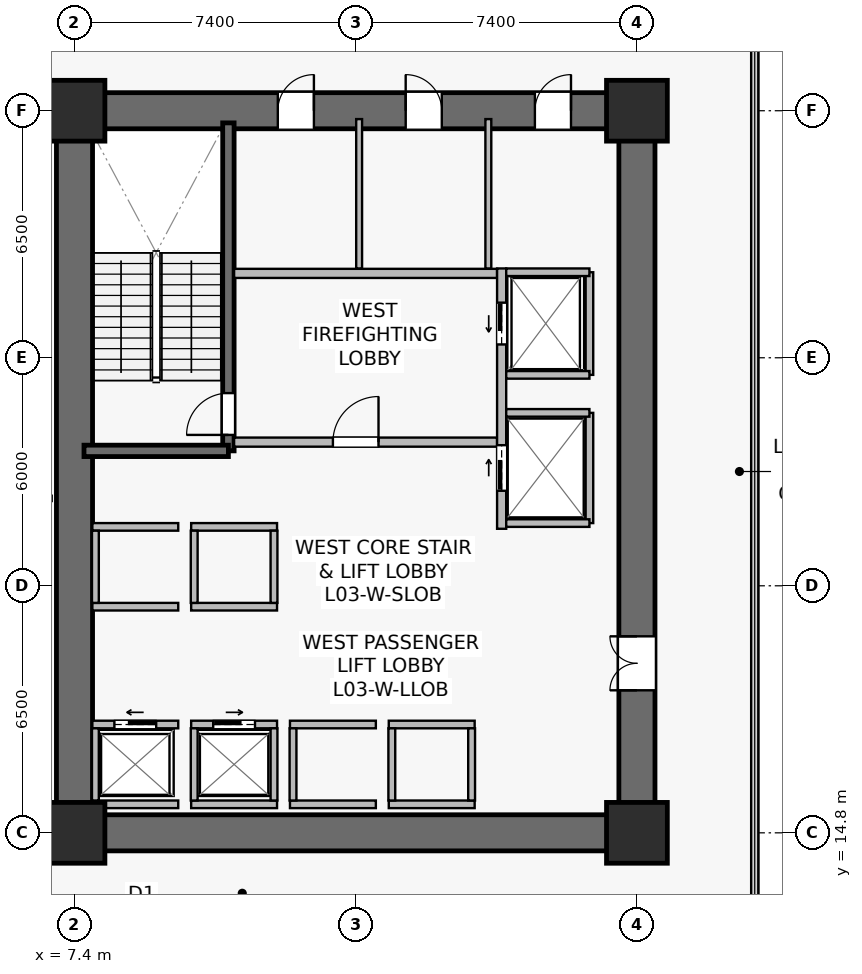
"""IFC4 building model, lengths in metres.
Left out: names, types, materials, properties, quantities, classifications, styles, units other than length and angle.
Written with IfcOpenShell. Run it as: python <this file> out.ifc"""

import sys

from ifc_helpers import new_model, si_unit, direction, frame, frame_2d, origin, origin_2d, place, context, subcontext, project, spatial, rectangle, extrude, source, transform, mapped, element, fill, save


model = new_model("IFC4")
c1 = context("Model", 3, precision=1e-05, world=origin(), true_north=direction((0.0, 1.0)))
c2 = subcontext(c1, "Body", "Model", "MODEL_VIEW")
j1 = project(units=[si_unit("LENGTHUNIT", "METRE"), si_unit("PLANEANGLEUNIT", "RADIAN")], contexts=[c1])
p1 = place(None, origin())
s1 = spatial("IfcSite", under=j1, at=p1, CompositionType="ELEMENT")
p2 = place(p1, origin())
s2 = spatial("IfcBuilding", under=s1, at=p2, CompositionType="ELEMENT")
p3 = place(p2, frame((0.0, 0.0, 10.2)))
s3 = spatial("IfcBuildingStorey", under=s2, at=p3, CompositionType="ELEMENT", Elevation=10.2)
p4 = place(p3, frame((6.925, 14.8, 0.0), z_axis=(0.0, 0.0, 1.0), x_axis=(1.0, 0.0, 0.0)))
e1 = element("IfcWall", 1, at=p4, inside=s3, PredefinedType="SHEAR", context=c2, shape_type="SweptSolid", body=[
    extrude(rectangle(XDim=15.75, YDim=0.95, at=frame_2d((7.875, 0.0))), origin(), (0.0, 0.0, 1.0), 4.45),
])
p5 = place(p3, frame((6.925, 33.8, 0.0), z_axis=(0.0, 0.0, 1.0), x_axis=(1.0, 0.0, 0.0)))
e2 = element("IfcWall", 2, at=p5, inside=s3, PredefinedType="SHEAR", context=c2, shape_type="SweptSolid", body=[
    extrude(rectangle(XDim=15.75, YDim=0.95, at=frame_2d((7.875, 0.0))), origin(), (0.0, 0.0, 1.0), 4.45),
])
p6 = place(p5, frame((5.825, 0.0, 0.0)))
e3 = element("IfcOpeningElement", 3, at=p6, cuts=e2, PredefinedType="OPENING", context=c2, shape_type="SweptSolid", body=[
    extrude(rectangle(XDim=0.95, YDim=2.15, at=frame_2d((0.475, 1.075))), frame((0.0, 0.485, 0.0), z_axis=(0.0, -1.0, 0.0), x_axis=(1.0, 0.0, 0.0)), (0.0, 0.0, 1.0), 0.97),
])
p7 = place(p5, frame((9.19, 0.0, 0.0)))
e4 = element("IfcOpeningElement", 4, at=p7, cuts=e2, PredefinedType="OPENING", context=c2, shape_type="SweptSolid", body=[
    extrude(rectangle(XDim=0.95, YDim=2.15, at=frame_2d((0.475, 1.075))), frame((0.0, 0.485, 0.0), z_axis=(0.0, -1.0, 0.0), x_axis=(1.0, 0.0, 0.0)), (0.0, 0.0, 1.0), 0.97),
])
p8 = place(p5, frame((12.59, 0.0, 0.0)))
e5 = element("IfcOpeningElement", 5, at=p8, cuts=e2, PredefinedType="OPENING", context=c2, shape_type="SweptSolid", body=[
    extrude(rectangle(XDim=0.95, YDim=2.15, at=frame_2d((0.475, 1.075))), frame((0.0, 0.485, 0.0), z_axis=(0.0, -1.0, 0.0), x_axis=(1.0, 0.0, 0.0)), (0.0, 0.0, 1.0), 0.97),
])
p9 = place(p3, frame((7.4, 15.275, 0.0), z_axis=(0.0, 0.0, 1.0), x_axis=(0.0, 1.0, 0.0)))
e6 = element("IfcWall", 6, at=p9, inside=s3, PredefinedType="SHEAR", context=c2, shape_type="SweptSolid", body=[
    extrude(rectangle(XDim=18.05, YDim=0.95, at=frame_2d((9.025, 0.0))), origin(), (0.0, 0.0, 1.0), 4.45),
])
p10 = place(p3, frame((22.2, 15.275, 0.0), z_axis=(0.0, 0.0, 1.0), x_axis=(0.0, 1.0, 0.0)))
e7 = element("IfcWall", 7, at=p10, inside=s3, PredefinedType="SHEAR", context=c2, shape_type="SweptSolid", body=[
    extrude(rectangle(XDim=18.05, YDim=0.95, at=frame_2d((9.025, 0.0))), origin(), (0.0, 0.0, 1.0), 4.45),
])
p11 = place(p10, frame((3.275, 0.0, 0.0)))
e8 = element("IfcOpeningElement", 8, at=p11, cuts=e7, PredefinedType="OPENING", context=c2, shape_type="SweptSolid", body=[
    extrude(rectangle(XDim=1.42, YDim=2.2, at=frame_2d((0.71, 1.1))), frame((0.0, 0.485, 0.0), z_axis=(0.0, -1.0, 0.0), x_axis=(1.0, 0.0, 0.0)), (0.0, 0.0, 1.0), 0.97),
])
p12 = place(p3, frame((11.45, 24.85, 0.0), z_axis=(0.0, 0.0, 1.0), x_axis=(0.0, 1.0, 0.0)))
e9 = element("IfcWall", 9, at=p12, inside=s3, PredefinedType="SHEAR", context=c2, shape_type="SweptSolid", body=[
    extrude(rectangle(XDim=8.63, YDim=0.3, at=frame_2d((4.315, 0.0))), origin(), (0.0, 0.0, 1.0), 4.45),
])
p13 = place(p12, frame((0.42, 0.0, 0.0)))
e10 = element("IfcOpeningElement", 10, at=p13, cuts=e9, PredefinedType="OPENING", context=c2, shape_type="SweptSolid", body=[
    extrude(rectangle(XDim=1.1, YDim=2.15, at=frame_2d((0.55, 1.075))), frame((0.0, 0.16, 0.0), z_axis=(0.0, -1.0, 0.0), x_axis=(1.0, 0.0, 0.0)), (0.0, 0.0, 1.0), 0.32),
])
p14 = place(p3, frame((7.65, 24.85, 0.0), z_axis=(0.0, 0.0, 1.0), x_axis=(1.0, 0.0, 0.0)))
e11 = element("IfcWall", 11, at=p14, inside=s3, PredefinedType="SHEAR", context=c2, shape_type="SweptSolid", body=[
    extrude(rectangle(XDim=3.8, YDim=0.3, at=frame_2d((1.9, 0.0))), origin(), (0.0, 0.0, 1.0), 4.45),
])
m1 = source(origin(), c2, "Body", "SweptSolid", [
    extrude(rectangle(XDim=1.6, YDim=1.6, at=origin_2d()), origin(), (0.0, 0.0, 1.0), 4.8),
])
for number, where, z_axis, x_axis in (
    (12, (7.4, 14.8, 0.0), (0.0, 0.0, 1.0), (1.0, 0.0, 0.0)),
    (13, (22.2, 14.8, 0.0), (0.0, 0.0, 1.0), (1.0, 0.0, 0.0)),
    (14, (7.4, 33.8, 0.0), (0.0, 0.0, 1.0), (1.0, 0.0, 0.0)),
    (15, (22.2, 33.8, 0.0), (0.0, 0.0, 1.0), (1.0, 0.0, 0.0)),
):
    element("IfcColumn", number, at=place(p3, frame(where, z_axis=z_axis, x_axis=x_axis)), inside=s3, PredefinedType="COLUMN", context=c2, shape_type="MappedRepresentation", body=[
        mapped(m1, transform((0.0, 0.0, 0.0), scale=1.0)),
    ])
p15 = place(p3, frame((11.6, 25.08, 0.0), z_axis=(0.0, 0.0, 1.0), x_axis=(1.0, 0.0, 0.0)))
e16 = element("IfcWall", 16, at=p15, inside=s3, PredefinedType="SOLIDWALL", context=c2, shape_type="SweptSolid", body=[
    extrude(rectangle(XDim=6.92, YDim=0.24, at=frame_2d((3.46, 0.0))), origin(), (0.0, 0.0, 1.0), 3.735),
])
p16 = place(p15, frame((2.6, 0.0, 0.0)))
e17 = element("IfcOpeningElement", 17, at=p16, cuts=e16, PredefinedType="OPENING", context=c2, shape_type="SweptSolid", body=[
    extrude(rectangle(XDim=1.2, YDim=2.16, at=frame_2d((0.6, 1.08))), frame((0.0, 0.13, 0.0), z_axis=(0.0, -1.0, 0.0), x_axis=(1.0, 0.0, 0.0)), (0.0, 0.0, 1.0), 0.26),
])
p17 = place(p3, frame((11.6, 29.52, 0.0), z_axis=(0.0, 0.0, 1.0), x_axis=(1.0, 0.0, 0.0)))
e18 = element("IfcWall", 18, at=p17, inside=s3, PredefinedType="SOLIDWALL", context=c2, shape_type="SweptSolid", body=[
    extrude(rectangle(XDim=6.92, YDim=0.24, at=frame_2d((3.46, 0.0))), origin(), (0.0, 0.0, 1.0), 3.735),
])
p18 = place(p3, frame((18.64, 22.8, 0.0), z_axis=(0.0, 0.0, 1.0), x_axis=(0.0, 1.0, 0.0)))
e19 = element("IfcWall", 19, at=p18, inside=s3, PredefinedType="SOLIDWALL", context=c2, shape_type="SweptSolid", body=[
    extrude(rectangle(XDim=6.85, YDim=0.24, at=frame_2d((3.425, 0.0))), origin(), (0.0, 0.0, 1.0), 3.535),
])
p19 = place(p18, frame((4.85, 0.0, 0.0)))
e20 = element("IfcOpeningElement", 20, at=p19, cuts=e19, PredefinedType="OPENING", context=c2, shape_type="SweptSolid", body=[
    extrude(rectangle(XDim=1.1, YDim=2.22, at=frame_2d((0.55, 1.11))), frame((0.0, 0.13, 0.0), z_axis=(0.0, -1.0, 0.0), x_axis=(1.0, 0.0, 0.0)), (0.0, 0.0, 1.0), 0.26),
])
p20 = place(p18, frame((1.0, 0.0, 0.0)))
e21 = element("IfcOpeningElement", 21, at=p20, cuts=e19, PredefinedType="OPENING", context=c2, shape_type="SweptSolid", body=[
    extrude(rectangle(XDim=1.2, YDim=2.22, at=frame_2d((0.6, 1.11))), frame((0.0, 0.13, 0.0), z_axis=(0.0, -1.0, 0.0), x_axis=(1.0, 0.0, 0.0)), (0.0, 0.0, 1.0), 0.26),
])
p21 = place(p3, frame((7.87, 17.65, 0.0), z_axis=(0.0, 0.0, 1.0), x_axis=(1.0, 0.0, 0.0)))
e22 = element("IfcWall", 22, at=p21, inside=s3, PredefinedType="SOLIDWALL", context=c2, shape_type="SweptSolid", body=[
    extrude(rectangle(XDim=2.26, YDim=0.2, at=frame_2d((1.13, 0.0))), origin(), (0.0, 0.0, 1.0), 4.45),
])
p22 = place(p21, frame((0.58, 0.0, 0.0)))
e23 = element("IfcOpeningElement", 23, at=p22, cuts=e22, PredefinedType="OPENING", context=c2, shape_type="SweptSolid", body=[
    extrude(rectangle(XDim=1.1, YDim=2.22, at=frame_2d((0.55, 1.11))), frame((0.0, 0.11, 0.0), z_axis=(0.0, -1.0, 0.0), x_axis=(1.0, 0.0, 0.0)), (0.0, 0.0, 1.0), 0.22),
])
p23 = place(p3, frame((7.87, 15.55, 0.0), z_axis=(0.0, 0.0, 1.0), x_axis=(1.0, 0.0, 0.0)))
e24 = element("IfcWall", 24, at=p23, inside=s3, PredefinedType="SOLIDWALL", context=c2, shape_type="SweptSolid", body=[
    extrude(rectangle(XDim=2.26, YDim=0.2, at=frame_2d((1.13, 0.0))), origin(), (0.0, 0.0, 1.0), 4.45),
])
p24 = place(p3, frame((7.95, 15.65, 0.0), z_axis=(0.0, 0.0, 1.0), x_axis=(0.0, 1.0, 0.0)))
e25 = element("IfcWall", 25, at=p24, inside=s3, PredefinedType="SOLIDWALL", context=c2, shape_type="SweptSolid", body=[
    extrude(rectangle(XDim=1.9, YDim=0.18, at=frame_2d((0.95, 0.0))), origin(), (0.0, 0.0, 1.0), 4.45),
])
p25 = place(p3, frame((10.47, 17.65, 0.0), z_axis=(0.0, 0.0, 1.0), x_axis=(1.0, 0.0, 0.0)))
e26 = element("IfcWall", 26, at=p25, inside=s3, PredefinedType="SOLIDWALL", context=c2, shape_type="SweptSolid", body=[
    extrude(rectangle(XDim=2.26, YDim=0.2, at=frame_2d((1.13, 0.0))), origin(), (0.0, 0.0, 1.0), 4.45),
])
p26 = place(p25, frame((0.58, 0.0, 0.0)))
e27 = element("IfcOpeningElement", 27, at=p26, cuts=e26, PredefinedType="OPENING", context=c2, shape_type="SweptSolid", body=[
    extrude(rectangle(XDim=1.1, YDim=2.22, at=frame_2d((0.55, 1.11))), frame((0.0, 0.11, 0.0), z_axis=(0.0, -1.0, 0.0), x_axis=(1.0, 0.0, 0.0)), (0.0, 0.0, 1.0), 0.22),
])
p27 = place(p3, frame((10.47, 15.55, 0.0), z_axis=(0.0, 0.0, 1.0), x_axis=(1.0, 0.0, 0.0)))
e28 = element("IfcWall", 28, at=p27, inside=s3, PredefinedType="SOLIDWALL", context=c2, shape_type="SweptSolid", body=[
    extrude(rectangle(XDim=2.26, YDim=0.2, at=frame_2d((1.13, 0.0))), origin(), (0.0, 0.0, 1.0), 4.45),
])
for number, where, z_axis, x_axis in (
    (29, (10.55, 15.65, 0.0), (0.0, 0.0, 1.0), (0.0, 1.0, 0.0)),
    (30, (12.65, 15.65, 0.0), (0.0, 0.0, 1.0), (0.0, 1.0, 0.0)),
):
    element("IfcWall", number, at=place(p3, frame(where, z_axis=z_axis, x_axis=x_axis)), inside=s3, PredefinedType="SOLIDWALL", context=c2, shape_type="SweptSolid", body=[
        extrude(rectangle(XDim=1.9, YDim=0.18, at=frame_2d((0.95, 0.0))), origin(), (0.0, 0.0, 1.0), 4.45),
    ])
for number, where, z_axis, x_axis in (
    (31, (13.07, 17.65, 0.0), (0.0, 0.0, 1.0), (1.0, 0.0, 0.0)),
    (32, (13.07, 15.55, 0.0), (0.0, 0.0, 1.0), (1.0, 0.0, 0.0)),
):
    element("IfcWall", number, at=place(p3, frame(where, z_axis=z_axis, x_axis=x_axis)), inside=s3, PredefinedType="SOLIDWALL", context=c2, shape_type="SweptSolid", body=[
        extrude(rectangle(XDim=2.26, YDim=0.2, at=frame_2d((1.13, 0.0))), origin(), (0.0, 0.0, 1.0), 3.735),
    ])
p28 = place(p3, frame((13.15, 15.65, 0.0), z_axis=(0.0, 0.0, 1.0), x_axis=(0.0, 1.0, 0.0)))
e33 = element("IfcWall", 33, at=p28, inside=s3, PredefinedType="SOLIDWALL", context=c2, shape_type="SweptSolid", body=[
    extrude(rectangle(XDim=1.9, YDim=0.18, at=frame_2d((0.95, 0.0))), origin(), (0.0, 0.0, 1.0), 4.45),
])
for number, where, z_axis, x_axis in (
    (34, (15.67, 17.65, 0.0), (0.0, 0.0, 1.0), (1.0, 0.0, 0.0)),
    (35, (15.67, 15.55, 0.0), (0.0, 0.0, 1.0), (1.0, 0.0, 0.0)),
):
    element("IfcWall", number, at=place(p3, frame(where, z_axis=z_axis, x_axis=x_axis)), inside=s3, PredefinedType="SOLIDWALL", context=c2, shape_type="SweptSolid", body=[
        extrude(rectangle(XDim=2.26, YDim=0.2, at=frame_2d((1.13, 0.0))), origin(), (0.0, 0.0, 1.0), 4.45),
    ])
for number, where, z_axis, x_axis in (
    (36, (15.75, 15.65, 0.0), (0.0, 0.0, 1.0), (0.0, 1.0, 0.0)),
    (37, (17.85, 15.65, 0.0), (0.0, 0.0, 1.0), (0.0, 1.0, 0.0)),
):
    element("IfcWall", number, at=place(p3, frame(where, z_axis=z_axis, x_axis=x_axis)), inside=s3, PredefinedType="SOLIDWALL", context=c2, shape_type="SweptSolid", body=[
        extrude(rectangle(XDim=1.9, YDim=0.18, at=frame_2d((0.95, 0.0))), origin(), (0.0, 0.0, 1.0), 4.45),
    ])
for number, where, z_axis, x_axis in (
    (38, (7.87, 20.75, 0.0), (0.0, 0.0, 1.0), (1.0, 0.0, 0.0)),
    (39, (7.87, 22.85, 0.0), (0.0, 0.0, 1.0), (1.0, 0.0, 0.0)),
):
    element("IfcWall", number, at=place(p3, frame(where, z_axis=z_axis, x_axis=x_axis)), inside=s3, PredefinedType="SOLIDWALL", context=c2, shape_type="SweptSolid", body=[
        extrude(rectangle(XDim=2.26, YDim=0.2, at=frame_2d((1.13, 0.0))), origin(), (0.0, 0.0, 1.0), 4.45),
    ])
p29 = place(p3, frame((7.95, 20.85, 0.0), z_axis=(0.0, 0.0, 1.0), x_axis=(0.0, 1.0, 0.0)))
e40 = element("IfcWall", 40, at=p29, inside=s3, PredefinedType="SOLIDWALL", context=c2, shape_type="SweptSolid", body=[
    extrude(rectangle(XDim=1.9, YDim=0.18, at=frame_2d((0.95, 0.0))), origin(), (0.0, 0.0, 1.0), 4.45),
])
for number, where, z_axis, x_axis in (
    (41, (10.47, 20.75, 0.0), (0.0, 0.0, 1.0), (1.0, 0.0, 0.0)),
    (42, (10.47, 22.85, 0.0), (0.0, 0.0, 1.0), (1.0, 0.0, 0.0)),
):
    element("IfcWall", number, at=place(p3, frame(where, z_axis=z_axis, x_axis=x_axis)), inside=s3, PredefinedType="SOLIDWALL", context=c2, shape_type="SweptSolid", body=[
        extrude(rectangle(XDim=2.26, YDim=0.2, at=frame_2d((1.13, 0.0))), origin(), (0.0, 0.0, 1.0), 4.45),
    ])
for number, where, z_axis, x_axis in (
    (43, (10.55, 20.85, 0.0), (0.0, 0.0, 1.0), (0.0, 1.0, 0.0)),
    (44, (12.65, 20.85, 0.0), (0.0, 0.0, 1.0), (0.0, 1.0, 0.0)),
):
    element("IfcWall", number, at=place(p3, frame(where, z_axis=z_axis, x_axis=x_axis)), inside=s3, PredefinedType="SOLIDWALL", context=c2, shape_type="SweptSolid", body=[
        extrude(rectangle(XDim=1.9, YDim=0.18, at=frame_2d((0.95, 0.0))), origin(), (0.0, 0.0, 1.0), 4.45),
    ])
p30 = place(p3, frame((20.95, 26.85, 0.0), z_axis=(0.0, 0.0, 1.0), x_axis=(0.0, 1.0, 0.0)))
e45 = element("IfcWall", 45, at=p30, inside=s3, PredefinedType="SOLIDWALL", context=c2, shape_type="SweptSolid", body=[
    extrude(rectangle(XDim=2.7, YDim=0.2, at=frame_2d((1.35, 0.0))), origin(), (0.0, 0.0, 1.0), 4.45),
])
p31 = place(p3, frame((18.76, 29.55, 0.0), z_axis=(0.0, 0.0, 1.0), x_axis=(1.0, 0.0, 0.0)))
e46 = element("IfcWall", 46, at=p31, inside=s3, PredefinedType="SOLIDWALL", context=c2, shape_type="SweptSolid", body=[
    extrude(rectangle(XDim=2.19, YDim=0.2, at=frame_2d((1.095, 0.0))), origin(), (0.0, 0.0, 1.0), 4.45),
])
p32 = place(p3, frame((18.76, 26.85, 0.0), z_axis=(0.0, 0.0, 1.0), x_axis=(1.0, 0.0, 0.0)))
e47 = element("IfcWall", 47, at=p32, inside=s3, PredefinedType="SOLIDWALL", context=c2, shape_type="SweptSolid", body=[
    extrude(rectangle(XDim=2.19, YDim=0.2, at=frame_2d((1.095, 0.0))), origin(), (0.0, 0.0, 1.0), 3.847),
])
p33 = place(p3, frame((20.95, 22.95, 0.0), z_axis=(0.0, 0.0, 1.0), x_axis=(0.0, 1.0, 0.0)))
e48 = element("IfcWall", 48, at=p33, inside=s3, PredefinedType="SOLIDWALL", context=c2, shape_type="SweptSolid", body=[
    extrude(rectangle(XDim=2.9, YDim=0.2, at=frame_2d((1.45, 0.0))), origin(), (0.0, 0.0, 1.0), 3.535),
])
for number, where, z_axis, x_axis in (
    (49, (18.76, 25.85, 0.0), (0.0, 0.0, 1.0), (1.0, 0.0, 0.0)),
    (50, (18.76, 22.95, 0.0), (0.0, 0.0, 1.0), (1.0, 0.0, 0.0)),
):
    element("IfcWall", number, at=place(p3, frame(where, z_axis=z_axis, x_axis=x_axis)), inside=s3, PredefinedType="SOLIDWALL", context=c2, shape_type="SweptSolid", body=[
        extrude(rectangle(XDim=2.19, YDim=0.2, at=frame_2d((1.095, 0.0))), origin(), (0.0, 0.0, 1.0), 4.45),
    ])
p34 = place(p3, frame((14.89, 29.65, 0.0), z_axis=(0.0, 0.0, 1.0), x_axis=(0.0, 1.0, 0.0)))
e51 = element("IfcWall", 51, at=p34, inside=s3, PredefinedType="PLUMBINGWALL", context=c2, shape_type="SweptSolid", body=[
    extrude(rectangle(XDim=3.93, YDim=0.155, at=frame_2d((1.965, 0.0))), origin(), (0.0, 0.0, 1.0), 3.735),
])
p35 = place(p3, frame((18.29, 29.65, 0.0), z_axis=(0.0, 0.0, 1.0), x_axis=(0.0, 1.0, 0.0)))
e52 = element("IfcWall", 52, at=p35, inside=s3, PredefinedType="PLUMBINGWALL", context=c2, shape_type="SweptSolid", body=[
    extrude(rectangle(XDim=3.93, YDim=0.155, at=frame_2d((1.965, 0.0))), origin(), (0.0, 0.0, 1.0), 4.45),
])
p36 = place(p3, frame((-0.85, 23.6, 0.0), z_axis=(0.0, 0.0, 1.0), x_axis=(1.0, 0.0, 0.0)))
e53 = element("IfcWall", 53, at=p36, inside=s3, PredefinedType="PARTITIONING", context=c2, shape_type="SweptSolid", body=[
    extrude(rectangle(XDim=7.65, YDim=0.14, at=frame_2d((3.825, 0.0))), origin(), (0.0, 0.0, 1.0), 3.835),
])
m2 = source(origin(), c2, "Body", "SweptSolid", [
    extrude(rectangle(XDim=1.1, YDim=2.15, at=frame_2d((0.55, 1.075))), frame((0.0, 0.025, 0.0), z_axis=(0.0, -1.0, 0.0), x_axis=(1.0, 0.0, 0.0)), (0.0, 0.0, 1.0), 0.05),
])
p37 = place(p13, origin())
e54 = element("IfcDoor", 54, at=p37, inside=s3, OperationType="SINGLE_SWING_LEFT", PredefinedType="DOOR", context=c2, shape_type="MappedRepresentation", body=[
    mapped(m2, transform((0.0, 0.0, 0.0), scale=1.0)),
])
fill(e10, e54)
m3 = source(origin(), c2, "Body", "SweptSolid", [
    extrude(rectangle(XDim=1.2, YDim=2.16, at=frame_2d((0.6, 1.08))), frame((0.0, 0.025, 0.0), z_axis=(0.0, -1.0, 0.0), x_axis=(1.0, 0.0, 0.0)), (0.0, 0.0, 1.0), 0.05),
])
p38 = place(p16, origin())
e55 = element("IfcDoor", 55, at=p38, inside=s3, OperationType="SINGLE_SWING_RIGHT", PredefinedType="DOOR", context=c2, shape_type="MappedRepresentation", body=[
    mapped(m3, transform((0.0, 0.0, 0.0), scale=1.0)),
])
fill(e17, e55)
m4 = source(origin(), c2, "Body", "SweptSolid", [
    extrude(rectangle(XDim=1.1, YDim=2.22, at=frame_2d((0.55, 1.11))), frame((0.0, 0.025, 0.0), z_axis=(0.0, -1.0, 0.0), x_axis=(1.0, 0.0, 0.0)), (0.0, 0.0, 1.0), 0.05),
])
p39 = place(p22, origin())
e56 = element("IfcDoor", 56, at=p39, inside=s3, OperationType="SLIDING_TO_LEFT", PredefinedType="USERDEFINED", context=c2, shape_type="MappedRepresentation", body=[
    mapped(m4, transform((0.0, 0.0, 0.0), scale=1.0)),
])
fill(e23, e56)
p40 = place(p26, origin())
e57 = element("IfcDoor", 57, at=p40, inside=s3, OperationType="SLIDING_TO_RIGHT", PredefinedType="USERDEFINED", context=c2, shape_type="MappedRepresentation", body=[
    mapped(m4, transform((0.0, 0.0, 0.0), scale=1.0)),
])
fill(e27, e57)
p41 = place(p19, origin())
e58 = element("IfcDoor", 58, at=p41, inside=s3, OperationType="SLIDING_TO_LEFT", PredefinedType="USERDEFINED", context=c2, shape_type="MappedRepresentation", body=[
    mapped(m4, transform((0.0, 0.0, 0.0), scale=1.0)),
])
fill(e20, e58)
m5 = source(origin(), c2, "Body", "SweptSolid", [
    extrude(rectangle(XDim=1.2, YDim=2.22, at=frame_2d((0.6, 1.11))), frame((0.0, 0.025, 0.0), z_axis=(0.0, -1.0, 0.0), x_axis=(1.0, 0.0, 0.0)), (0.0, 0.0, 1.0), 0.05),
])
p42 = place(p20, origin())
e59 = element("IfcDoor", 59, at=p42, inside=s3, OperationType="SLIDING_TO_RIGHT", PredefinedType="USERDEFINED", context=c2, shape_type="MappedRepresentation", body=[
    mapped(m5, transform((0.0, 0.0, 0.0), scale=1.0)),
])
fill(e21, e59)
m6 = source(origin(), c2, "Body", "SweptSolid", [
    extrude(rectangle(XDim=1.42, YDim=2.2, at=frame_2d((0.71, 1.1))), frame((0.0, 0.025, 0.0), z_axis=(0.0, -1.0, 0.0), x_axis=(1.0, 0.0, 0.0)), (0.0, 0.0, 1.0), 0.05),
])
p43 = place(p11, origin())
e60 = element("IfcDoor", 60, at=p43, inside=s3, OperationType="DOUBLE_DOOR_SINGLE_SWING", PredefinedType="DOOR", context=c2, shape_type="MappedRepresentation", body=[
    mapped(m6, transform((0.0, 0.0, 0.0), scale=1.0)),
])
fill(e8, e60)
m7 = source(origin(), c2, "Body", "SweptSolid", [
    extrude(rectangle(XDim=0.95, YDim=2.15, at=frame_2d((0.475, 1.075))), frame((0.0, 0.025, 0.0), z_axis=(0.0, -1.0, 0.0), x_axis=(1.0, 0.0, 0.0)), (0.0, 0.0, 1.0), 0.05),
])
p44 = place(p6, origin())
e61 = element("IfcDoor", 61, at=p44, inside=s3, OperationType="SINGLE_SWING_RIGHT", PredefinedType="DOOR", context=c2, shape_type="MappedRepresentation", body=[
    mapped(m7, transform((0.0, 0.0, 0.0), scale=1.0)),
])
fill(e3, e61)
p45 = place(p7, origin())
e62 = element("IfcDoor", 62, at=p45, inside=s3, OperationType="SINGLE_SWING_LEFT", PredefinedType="DOOR", context=c2, shape_type="MappedRepresentation", body=[
    mapped(m7, transform((0.0, 0.0, 0.0), scale=1.0)),
])
fill(e4, e62)
p46 = place(p8, origin())
e63 = element("IfcDoor", 63, at=p46, inside=s3, OperationType="SINGLE_SWING_RIGHT", PredefinedType="DOOR", context=c2, shape_type="MappedRepresentation", body=[
    mapped(m7, transform((0.0, 0.0, 0.0), scale=1.0)),
])
fill(e5, e63)
save(model, sys.argv[1])
